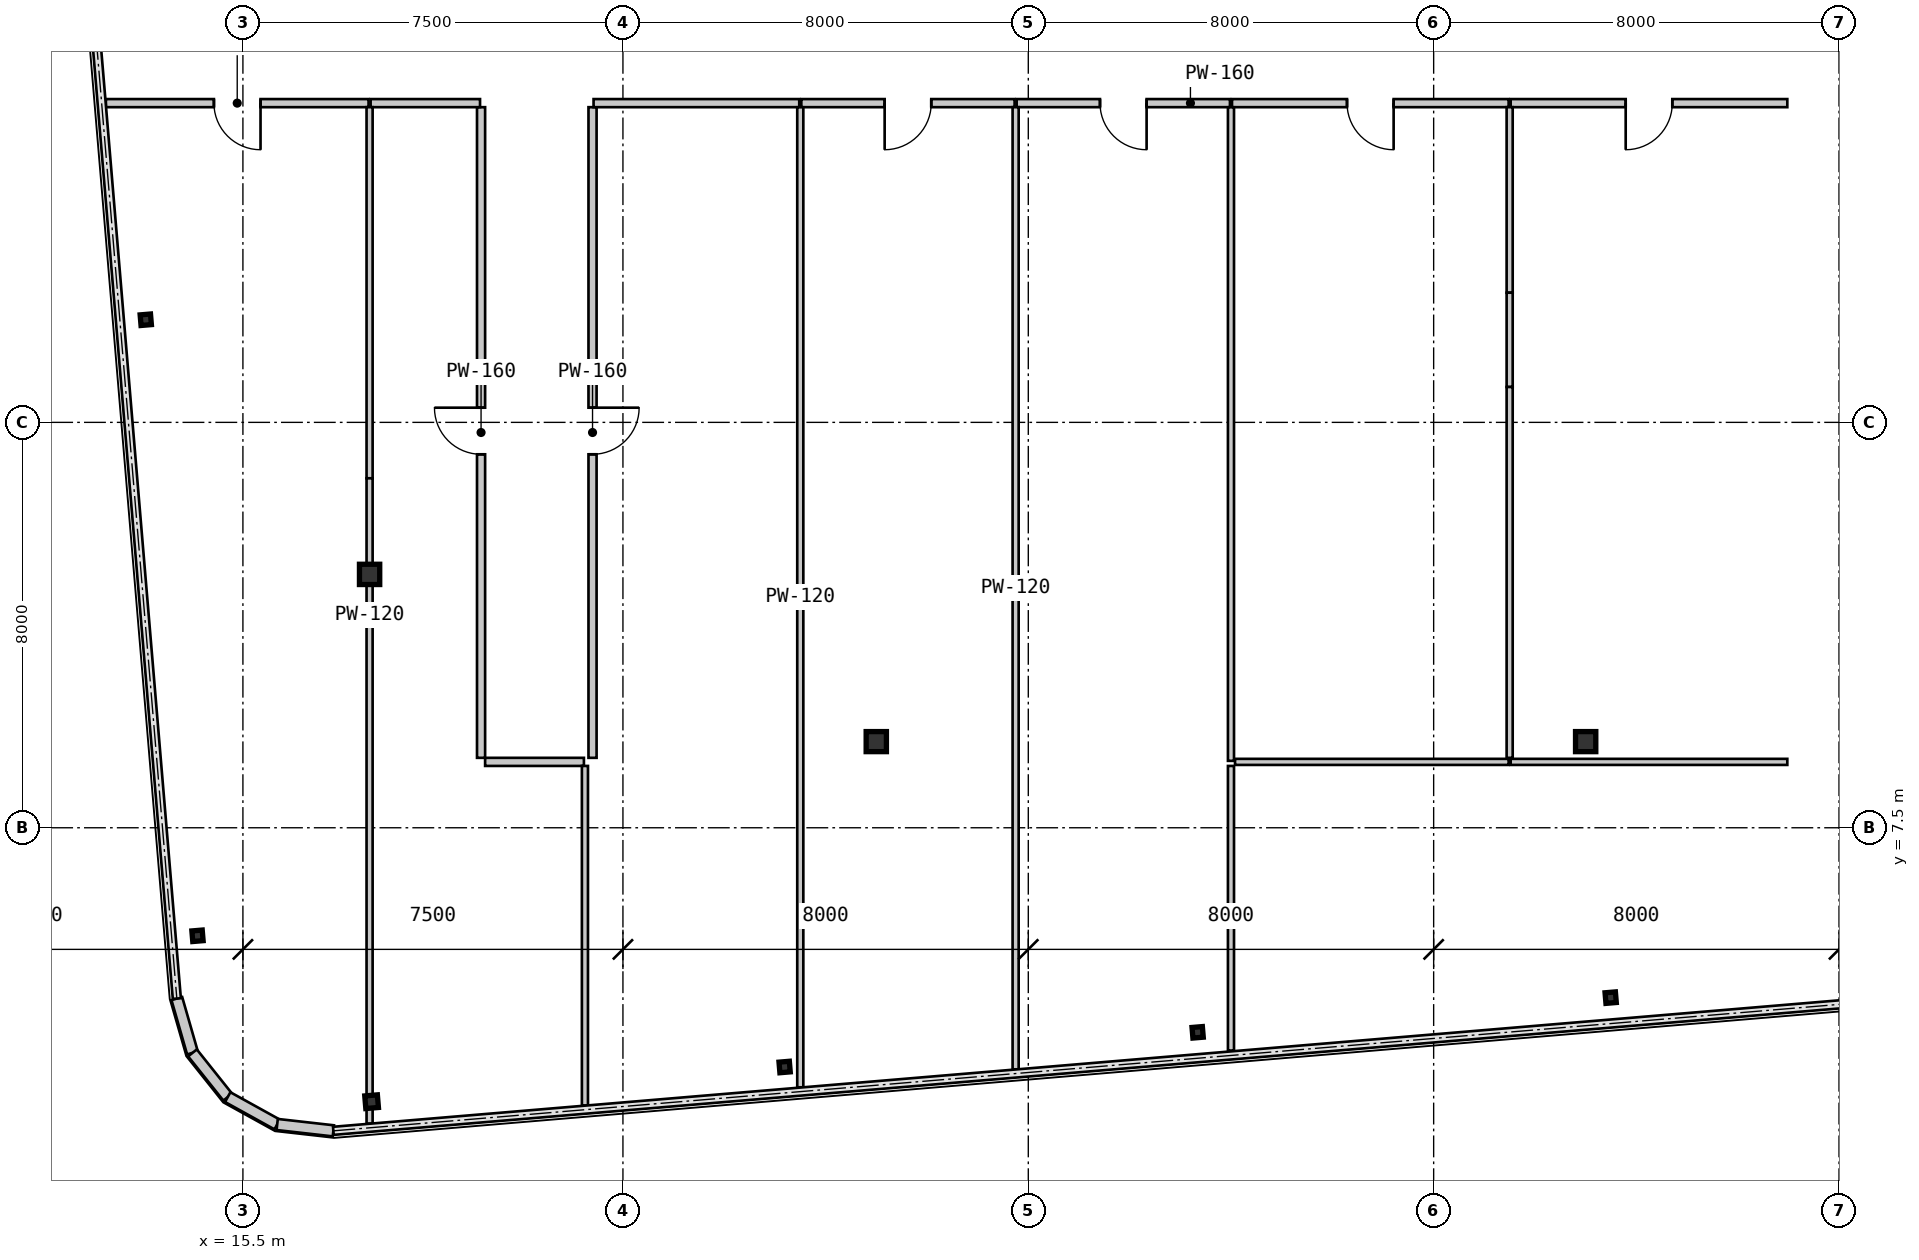
"""IFC4 building model, lengths in metres.
Left out: names, types, materials, properties, quantities, classifications, styles, units other than length and angle.
Written with IfcOpenShell. Run it as: python <this file> out.ifc"""

import sys

from ifc_helpers import new_model, si_unit, direction, frame, frame_2d, origin, origin_2d, place, context, subcontext, project, spatial, rectangle, hollow_rectangle, i_section, extrude, source, transform, mapped, element, fill, save


model = new_model("IFC4")
c1 = context("Model", 3, precision=1e-05, world=origin(), true_north=direction((0.0, 1.0)))
c2 = subcontext(c1, "Body", "Model", "MODEL_VIEW")
j1 = project(units=[si_unit("LENGTHUNIT", "METRE"), si_unit("PLANEANGLEUNIT", "RADIAN")], contexts=[c1])
p1 = place(None, origin())
s1 = spatial("IfcSite", under=j1, at=p1, CompositionType="ELEMENT")
p2 = place(p1, origin())
s2 = spatial("IfcBuilding", under=s1, at=p2, CompositionType="ELEMENT")
p3 = place(p2, frame((0.0, 0.0, 191.45)))
s3 = spatial("IfcBuildingStorey", under=s2, at=p3, CompositionType="ELEMENT", Elevation=191.45)
m1 = source(origin(), c2, "Body", "SweptSolid", [
    extrude(i_section(OverallWidth=0.4, OverallDepth=0.396, WebThickness=0.022, FlangeThickness=0.034, at=origin_2d()), origin(), (0.0, 0.0, 1.0), 3.15),
])
for number, where, z_axis, x_axis in (
    (1, (28.0, 9.2, 0.0), (0.0, 0.0, 1.0), (1.0, 0.0, 0.0)),
    (2, (42.0, 9.2, 0.0), (0.0, 0.0, 1.0), (1.0, 0.0, 0.0)),
):
    element("IfcColumn", number, at=place(p3, frame(where, z_axis=z_axis, x_axis=x_axis)), inside=s3, PredefinedType="COLUMN", context=c2, shape_type="MappedRepresentation", body=[
        mapped(m1, transform((0.0, 0.0, 0.0), scale=1.0)),
    ])
m2 = source(origin(), c2, "Body", "SweptSolid", [
    extrude(hollow_rectangle(XDim=0.4, YDim=0.4, WallThickness=0.016, at=origin_2d()), origin(), (0.0, 0.0, 1.0), 3.15),
])
p4 = place(p3, frame((18.0, 12.5, 0.0), z_axis=(0.0, 0.0, 1.0), x_axis=(1.0, 0.0, 0.0)))
e3 = element("IfcColumn", 3, at=p4, inside=s3, PredefinedType="COLUMN", context=c2, shape_type="MappedRepresentation", body=[
    mapped(m2, transform((0.0, 0.0, 0.0), scale=1.0)),
])
m3 = source(origin(), c2, "Body", "SweptSolid", [
    extrude(hollow_rectangle(XDim=0.25, YDim=0.25, WallThickness=0.01, at=origin_2d()), origin(), (0.0, 0.0, 1.0), 3.15),
])
p5 = place(p3, frame((18.04, 2.094, 0.0), z_axis=(0.0, 0.0, 1.0), x_axis=(0.99649285925, 0.083677843332, 0.0)))
e4 = element("IfcColumn", 4, at=p5, inside=s3, PredefinedType="COLUMN", context=c2, shape_type="MappedRepresentation", body=[
    mapped(m3, transform((0.0, 0.0, 0.0), scale=1.0)),
])
m4 = source(origin(), c2, "Body", "SweptSolid", [
    extrude(i_section(OverallWidth=0.205, OverallDepth=0.21, WebThickness=0.009, FlangeThickness=0.014, at=origin_2d()), origin(), (0.0, 0.0, 1.0), 3.15),
])
for number, where, z_axis, x_axis in (
    (5, (26.191, 2.779, 0.0), (0.0, 0.0, 1.0), (0.996, 0.084, 0.0)),
    (6, (34.342, 3.463, 0.0), (0.0, 0.0, 1.0), (0.996, 0.084, 0.0)),
    (7, (42.494, 4.147, 0.0), (0.0, 0.0, 1.0), (0.996, 0.084, 0.0)),
    (8, (14.604, 5.368, 0.0), (0.0, 0.0, 1.0), (0.996, 0.084, 0.0)),
    (9, (13.583, 17.525, 0.0), (0.0, 0.0, 1.0), (0.996, 0.084, 0.0)),
):
    element("IfcColumn", number, at=place(p3, frame(where, z_axis=z_axis, x_axis=x_axis)), inside=s3, PredefinedType="COLUMN", context=c2, shape_type="MappedRepresentation", body=[
        mapped(m4, transform((0.0, 0.0, 0.0), scale=1.0)),
    ])
m5 = source(origin(), c2, "Body", "SweptSolid", [
    extrude(rectangle(XDim=1.116, YDim=0.22, at=frame_2d((0.558, 0.0))), origin(), (0.0, 0.0, 1.0), 2.93),
])
for number, where, z_axis, x_axis in (
    (10, (14.196, 4.13, 0.0), (0.0, 0.0, 1.0), (0.277, -0.961, 0.0)),
    (11, (14.504, 3.057, 0.0), (0.0, 0.0, 1.0), (0.623, -0.782, 0.0)),
    (12, (15.2, 2.184, 0.0), (0.0, 0.0, 1.0), (0.875, -0.484, 0.0)),
    (13, (16.176, 1.644, 0.0), (0.0, 0.0, 1.0), (0.994, -0.112, 0.0)),
):
    element("IfcWall", number, at=place(p3, frame(where, z_axis=z_axis, x_axis=x_axis)), inside=s3, PredefinedType="SOLIDWALL", context=c2, shape_type="MappedRepresentation", body=[
        mapped(m5, transform((0.0, 0.0, 0.0), scale=1.0)),
    ])
m6 = source(origin(), c2, "Body", "SweptSolid", [
    extrude(rectangle(XDim=5.184, YDim=0.16, at=frame_2d((2.592, 0.0))), origin(), (0.0, 0.0, 1.0), 2.93),
])
p6 = place(p3, frame((17.98, 21.8, 0.0), z_axis=(0.0, 0.0, 1.0), x_axis=(-1.0, 0.0, 0.0)))
e14 = element("IfcWall", 14, at=p6, inside=s3, PredefinedType="PARTITIONING", context=c2, shape_type="MappedRepresentation", body=[
    mapped(m6, transform((0.0, 0.0, 0.0), scale=1.0)),
])
m7 = source(origin(), c2, "Body", "SweptSolid", [
    extrude(rectangle(XDim=0.92, YDim=2.1, at=frame_2d((0.46, 1.05))), frame((0.0, 0.09, 0.0), z_axis=(0.0, -1.0, 0.0), x_axis=(1.0, 0.0, 0.0)), (0.0, 0.0, 1.0), 0.18),
])
p7 = place(p6, frame((2.132, 0.0, 0.0)))
e15 = element("IfcOpeningElement", 15, at=p7, cuts=e14, PredefinedType="OPENING", context=c2, shape_type="MappedRepresentation", body=[
    mapped(m7, transform((0.0, 0.0, 0.0), scale=1.0)),
])
m8 = source(origin(), c2, "Body", "SweptSolid", [
    extrude(rectangle(XDim=12.84, YDim=0.16, at=frame_2d((6.42, 0.0))), origin(), (0.0, 0.0, 1.0), 2.93),
])
p8 = place(p3, frame((20.2, 8.88, 0.0), z_axis=(0.0, 0.0, 1.0), x_axis=(0.0, 1.0, 0.0)))
e16 = element("IfcWall", 16, at=p8, inside=s3, PredefinedType="PARTITIONING", context=c2, shape_type="MappedRepresentation", body=[
    mapped(m8, transform((0.0, 0.0, 0.0), scale=1.0)),
])
p9 = place(p8, frame((5.99, 0.0, 0.0)))
e17 = element("IfcOpeningElement", 17, at=p9, cuts=e16, PredefinedType="OPENING", context=c2, shape_type="MappedRepresentation", body=[
    mapped(m7, transform((0.0, 0.0, 0.0), scale=1.0)),
])
m9 = source(origin(), c2, "Body", "SweptSolid", [
    extrude(rectangle(XDim=2.159, YDim=0.16, at=frame_2d((1.08, 0.0))), origin(), (0.0, 0.0, 1.0), 2.93),
])
p10 = place(p3, frame((20.18, 21.8, 0.0), z_axis=(0.0, 0.0, 1.0), x_axis=(-1.0, 0.0, 0.0)))
e18 = element("IfcWall", 18, at=p10, inside=s3, PredefinedType="PARTITIONING", context=c2, shape_type="MappedRepresentation", body=[
    mapped(m9, transform((0.0, 0.0, 0.0), scale=1.0)),
])
m10 = source(origin(), c2, "Body", "SweptSolid", [
    extrude(rectangle(XDim=1.95, YDim=0.16, at=frame_2d((0.975, 0.0))), origin(), (0.0, 0.0, 1.0), 2.93),
])
p11 = place(p3, frame((22.23, 8.8, 0.0), z_axis=(0.0, 0.0, 1.0), x_axis=(-1.0, 0.0, 0.0)))
e19 = element("IfcWall", 19, at=p11, inside=s3, PredefinedType="PARTITIONING", context=c2, shape_type="MappedRepresentation", body=[
    mapped(m10, transform((0.0, 0.0, 0.0), scale=1.0)),
])
p12 = place(p3, frame((22.4, 21.72, 0.0), z_axis=(0.0, 0.0, 1.0), x_axis=(0.0, -1.0, 0.0)))
e20 = element("IfcWall", 20, at=p12, inside=s3, PredefinedType="PARTITIONING", context=c2, shape_type="MappedRepresentation", body=[
    mapped(m8, transform((0.0, 0.0, 0.0), scale=1.0)),
])
p13 = place(p12, frame((5.93, 0.0, 0.0)))
e21 = element("IfcOpeningElement", 21, at=p13, cuts=e20, PredefinedType="OPENING", context=c2, shape_type="MappedRepresentation", body=[
    mapped(m7, transform((0.0, 0.0, 0.0), scale=1.0)),
])
m11 = source(origin(), c2, "Body", "SweptSolid", [
    extrude(rectangle(XDim=4.059, YDim=0.16, at=frame_2d((2.03, 0.0))), origin(), (0.0, 0.0, 1.0), 2.93),
])
p14 = place(p3, frame((26.48, 21.8, 0.0), z_axis=(0.0, 0.0, 1.0), x_axis=(-1.0, 0.0, 0.0)))
e22 = element("IfcWall", 22, at=p14, inside=s3, PredefinedType="PARTITIONING", context=c2, shape_type="MappedRepresentation", body=[
    mapped(m11, transform((0.0, 0.0, 0.0), scale=1.0)),
])
m12 = source(origin(), c2, "Body", "SweptSolid", [
    extrude(rectangle(XDim=4.209, YDim=0.16, at=frame_2d((2.105, 0.0))), origin(), (0.0, 0.0, 1.0), 2.93),
])
p15 = place(p3, frame((30.73, 21.8, 0.0), z_axis=(0.0, 0.0, 1.0), x_axis=(-1.0, 0.0, 0.0)))
e23 = element("IfcWall", 23, at=p15, inside=s3, PredefinedType="PARTITIONING", context=c2, shape_type="MappedRepresentation", body=[
    mapped(m12, transform((0.0, 0.0, 0.0), scale=1.0)),
])
p16 = place(p15, frame((1.645, 0.0, 0.0)))
e24 = element("IfcOpeningElement", 24, at=p16, cuts=e23, PredefinedType="OPENING", context=c2, shape_type="MappedRepresentation", body=[
    mapped(m7, transform((0.0, 0.0, 0.0), scale=1.0)),
])
p17 = place(p3, frame((34.98, 21.8, 0.0), z_axis=(0.0, 0.0, 1.0), x_axis=(-1.0, 0.0, 0.0)))
e25 = element("IfcWall", 25, at=p17, inside=s3, PredefinedType="PARTITIONING", context=c2, shape_type="MappedRepresentation", body=[
    mapped(m12, transform((0.0, 0.0, 0.0), scale=1.0)),
])
p18 = place(p17, frame((1.645, 0.0, 0.0)))
e26 = element("IfcOpeningElement", 26, at=p18, cuts=e25, PredefinedType="OPENING", context=c2, shape_type="MappedRepresentation", body=[
    mapped(m7, transform((0.0, 0.0, 0.0), scale=1.0)),
])
m13 = source(origin(), c2, "Body", "SweptSolid", [
    extrude(rectangle(XDim=5.459, YDim=0.16, at=frame_2d((2.73, 0.0))), origin(), (0.0, 0.0, 1.0), 2.93),
])
p19 = place(p3, frame((40.48, 21.8, 0.0), z_axis=(0.0, 0.0, 1.0), x_axis=(-1.0, 0.0, 0.0)))
e27 = element("IfcWall", 27, at=p19, inside=s3, PredefinedType="PARTITIONING", context=c2, shape_type="MappedRepresentation", body=[
    mapped(m13, transform((0.0, 0.0, 0.0), scale=1.0)),
])
p20 = place(p19, frame((2.27, 0.0, 0.0)))
e28 = element("IfcOpeningElement", 28, at=p20, cuts=e27, PredefinedType="OPENING", context=c2, shape_type="MappedRepresentation", body=[
    mapped(m7, transform((0.0, 0.0, 0.0), scale=1.0)),
])
p21 = place(p3, frame((45.98, 21.8, 0.0), z_axis=(0.0, 0.0, 1.0), x_axis=(-1.0, 0.0, 0.0)))
e29 = element("IfcWall", 29, at=p21, inside=s3, PredefinedType="PARTITIONING", context=c2, shape_type="MappedRepresentation", body=[
    mapped(m13, transform((0.0, 0.0, 0.0), scale=1.0)),
])
p22 = place(p21, frame((2.27, 0.0, 0.0)))
e30 = element("IfcOpeningElement", 30, at=p22, cuts=e29, PredefinedType="OPENING", context=c2, shape_type="MappedRepresentation", body=[
    mapped(m7, transform((0.0, 0.0, 0.0), scale=1.0)),
])
m14 = source(origin(), c2, "Body", "SweptSolid", [
    extrude(rectangle(XDim=5.616, YDim=0.12, at=frame_2d((2.808, 0.0))), origin(), (0.0, 0.0, 1.0), 2.93),
])
p23 = place(p3, frame((35.0, 3.104, 0.0), z_axis=(0.0, 0.0, 1.0), x_axis=(0.0, 1.0, 0.0)))
e31 = element("IfcWall", 31, at=p23, inside=s3, PredefinedType="PARTITIONING", context=c2, shape_type="MappedRepresentation", body=[
    mapped(m14, transform((0.0, 0.0, 0.0), scale=1.0)),
])
m15 = source(origin(), c2, "Body", "SweptSolid", [
    extrude(rectangle(XDim=5.4, YDim=0.12, at=frame_2d((2.7, 0.0))), origin(), (0.0, 0.0, 1.0), 2.93),
])
p24 = place(p3, frame((35.08, 8.8, 0.0), z_axis=(0.0, 0.0, 1.0), x_axis=(1.0, 0.0, 0.0)))
e32 = element("IfcWall", 32, at=p24, inside=s3, PredefinedType="PARTITIONING", context=c2, shape_type="MappedRepresentation", body=[
    mapped(m15, transform((0.0, 0.0, 0.0), scale=1.0)),
])
m16 = source(origin(), c2, "Body", "SweptSolid", [
    extrude(rectangle(XDim=5.459, YDim=0.12, at=frame_2d((2.73, 0.0))), origin(), (0.0, 0.0, 1.0), 2.93),
])
p25 = place(p3, frame((40.52, 8.8, 0.0), z_axis=(0.0, 0.0, 1.0), x_axis=(1.0, 0.0, 0.0)))
e33 = element("IfcWall", 33, at=p25, inside=s3, PredefinedType="PARTITIONING", context=c2, shape_type="MappedRepresentation", body=[
    mapped(m16, transform((0.0, 0.0, 0.0), scale=1.0)),
])
m17 = source(origin(), c2, "Body", "SweptSolid", [
    extrude(rectangle(XDim=7.324, YDim=0.12, at=frame_2d((3.662, 0.0))), origin(), (0.0, 0.0, 1.0), 2.93),
])
p26 = place(p3, frame((18.0, 21.72, 0.0), z_axis=(0.0, 0.0, 1.0), x_axis=(0.0, -1.0, 0.0)))
e34 = element("IfcWall", 34, at=p26, inside=s3, PredefinedType="PARTITIONING", context=c2, shape_type="MappedRepresentation", body=[
    mapped(m17, transform((0.0, 0.0, 0.0), scale=1.0)),
])
m18 = source(origin(), c2, "Body", "SweptSolid", [
    extrude(rectangle(XDim=1.901, YDim=0.12, at=frame_2d((0.951, 0.0))), origin(), (0.0, 0.0, 1.0), 2.397),
])
p27 = place(p3, frame((18.0, 14.396, 0.0), z_axis=(0.0, 0.0, 1.0), x_axis=(0.0, -1.0, 0.0)))
e35 = element("IfcWall", 35, at=p27, inside=s3, PredefinedType="PARTITIONING", context=c2, shape_type="MappedRepresentation", body=[
    mapped(m18, transform((0.0, 0.0, 0.0), scale=1.0)),
])
m19 = source(origin(), c2, "Body", "SweptSolid", [
    extrude(rectangle(XDim=10.401, YDim=0.12, at=frame_2d((5.201, 0.0))), origin(), (0.0, 0.0, 1.0), 2.47),
])
p28 = place(p3, frame((18.0, 12.495, 0.0), z_axis=(0.0, 0.0, 1.0), x_axis=(0.0, -1.0, 0.0)))
e36 = element("IfcWall", 36, at=p28, inside=s3, PredefinedType="PARTITIONING", context=c2, shape_type="MappedRepresentation", body=[
    mapped(m19, transform((0.0, 0.0, 0.0), scale=1.0)),
])
m20 = source(origin(), c2, "Body", "SweptSolid", [
    extrude(rectangle(XDim=0.431, YDim=0.12, at=frame_2d((0.216, 0.0))), origin(), (0.0, 0.0, 1.0), 2.93),
])
p29 = place(p3, frame((18.0, 2.094, 0.0), z_axis=(0.0, 0.0, 1.0), x_axis=(0.0, -1.0, 0.0)))
e37 = element("IfcWall", 37, at=p29, inside=s3, PredefinedType="PARTITIONING", context=c2, shape_type="MappedRepresentation", body=[
    mapped(m20, transform((0.0, 0.0, 0.0), scale=1.0)),
])
m21 = source(origin(), c2, "Body", "SweptSolid", [
    extrude(rectangle(XDim=6.701, YDim=0.12, at=frame_2d((3.35, 0.0))), origin(), (0.0, 0.0, 1.0), 2.93),
])
p30 = place(p3, frame((22.25, 8.72, 0.0), z_axis=(0.0, 0.0, 1.0), x_axis=(0.0, -1.0, 0.0)))
e38 = element("IfcWall", 38, at=p30, inside=s3, PredefinedType="PARTITIONING", context=c2, shape_type="MappedRepresentation", body=[
    mapped(m21, transform((0.0, 0.0, 0.0), scale=1.0)),
])
m22 = source(origin(), c2, "Body", "SweptSolid", [
    extrude(rectangle(XDim=19.34, YDim=0.12, at=frame_2d((9.67, 0.0))), origin(), (0.0, 0.0, 1.0), 2.93),
])
p31 = place(p3, frame((26.5, 21.718, 0.0), z_axis=(0.0, 0.0, 1.0), x_axis=(0.0, -1.0, 0.0)))
e39 = element("IfcWall", 39, at=p31, inside=s3, PredefinedType="PARTITIONING", context=c2, shape_type="MappedRepresentation", body=[
    mapped(m22, transform((0.0, 0.0, 0.0), scale=1.0)),
])
m23 = source(origin(), c2, "Body", "SweptSolid", [
    extrude(rectangle(XDim=18.987, YDim=0.12, at=frame_2d((9.493, 0.0))), origin(), (0.0, 0.0, 1.0), 2.93),
])
p32 = place(p3, frame((30.75, 21.72, 0.0), z_axis=(0.0, 0.0, 1.0), x_axis=(0.0, -1.0, 0.0)))
e40 = element("IfcWall", 40, at=p32, inside=s3, PredefinedType="PARTITIONING", context=c2, shape_type="MappedRepresentation", body=[
    mapped(m23, transform((0.0, 0.0, 0.0), scale=1.0)),
])
m24 = source(origin(), c2, "Body", "SweptSolid", [
    extrude(rectangle(XDim=12.898, YDim=0.12, at=frame_2d((6.449, 0.0))), origin(), (0.0, 0.0, 1.0), 2.93),
])
p33 = place(p3, frame((35.0, 21.718, 0.0), z_axis=(0.0, 0.0, 1.0), x_axis=(0.0, -1.0, 0.0)))
e41 = element("IfcWall", 41, at=p33, inside=s3, PredefinedType="PARTITIONING", context=c2, shape_type="MappedRepresentation", body=[
    mapped(m24, transform((0.0, 0.0, 0.0), scale=1.0)),
])
m25 = source(origin(), c2, "Body", "SweptSolid", [
    extrude(rectangle(XDim=3.661, YDim=0.12, at=frame_2d((1.831, 0.0))), origin(), (0.0, 0.0, 1.0), 2.93),
])
p34 = place(p3, frame((40.5, 21.72, 0.0), z_axis=(0.0, 0.0, 1.0), x_axis=(0.0, -1.0, 0.0)))
e42 = element("IfcWall", 42, at=p34, inside=s3, PredefinedType="PARTITIONING", context=c2, shape_type="MappedRepresentation", body=[
    mapped(m25, transform((0.0, 0.0, 0.0), scale=1.0)),
])
m26 = source(origin(), c2, "Body", "SweptSolid", [
    extrude(rectangle(XDim=1.861, YDim=0.12, at=frame_2d((0.93, 0.0))), origin(), (0.0, 0.0, 1.0), 2.328),
])
p35 = place(p3, frame((40.5, 18.059, 0.0), z_axis=(0.0, 0.0, 1.0), x_axis=(0.0, -1.0, 0.0)))
e43 = element("IfcWall", 43, at=p35, inside=s3, PredefinedType="PARTITIONING", context=c2, shape_type="MappedRepresentation", body=[
    mapped(m26, transform((0.0, 0.0, 0.0), scale=1.0)),
])
m27 = source(origin(), c2, "Body", "SweptSolid", [
    extrude(rectangle(XDim=7.318, YDim=0.12, at=frame_2d((3.659, 0.0))), origin(), (0.0, 0.0, 1.0), 2.93),
])
p36 = place(p3, frame((40.5, 16.198, 0.0), z_axis=(0.0, 0.0, 1.0), x_axis=(0.0, -1.0, 0.0)))
e44 = element("IfcWall", 44, at=p36, inside=s3, PredefinedType="PARTITIONING", context=c2, shape_type="MappedRepresentation", body=[
    mapped(m27, transform((0.0, 0.0, 0.0), scale=1.0)),
])
m28 = source(origin(), c2, "Body", "SweptSolid", [
    extrude(rectangle(XDim=0.92, YDim=2.1, at=frame_2d((0.46, 1.05))), frame((0.0, 0.025, 0.0), z_axis=(0.0, -1.0, 0.0), x_axis=(1.0, 0.0, 0.0)), (0.0, 0.0, 1.0), 0.05),
])
p37 = place(p7, origin())
e45 = element("IfcDoor", 45, at=p37, inside=s3, OperationType="SINGLE_SWING_LEFT", PredefinedType="DOOR", context=c2, shape_type="MappedRepresentation", body=[
    mapped(m28, transform((0.0, 0.0, 0.0), scale=1.0)),
])
fill(e15, e45)
p38 = place(p9, origin())
e46 = element("IfcDoor", 46, at=p38, inside=s3, OperationType="SINGLE_SWING_RIGHT", PredefinedType="DOOR", context=c2, shape_type="MappedRepresentation", body=[
    mapped(m28, transform((0.0, 0.0, 0.0), scale=1.0)),
])
fill(e17, e46)
p39 = place(p13, origin())
e47 = element("IfcDoor", 47, at=p39, inside=s3, OperationType="SINGLE_SWING_LEFT", PredefinedType="DOOR", context=c2, shape_type="MappedRepresentation", body=[
    mapped(m28, transform((0.0, 0.0, 0.0), scale=1.0)),
])
fill(e21, e47)
p40 = place(p16, origin())
e48 = element("IfcDoor", 48, at=p40, inside=s3, OperationType="SINGLE_SWING_RIGHT", PredefinedType="DOOR", context=c2, shape_type="MappedRepresentation", body=[
    mapped(m28, transform((0.0, 0.0, 0.0), scale=1.0)),
])
fill(e24, e48)
p41 = place(p18, origin())
e49 = element("IfcDoor", 49, at=p41, inside=s3, OperationType="SINGLE_SWING_LEFT", PredefinedType="DOOR", context=c2, shape_type="MappedRepresentation", body=[
    mapped(m28, transform((0.0, 0.0, 0.0), scale=1.0)),
])
fill(e26, e49)
p42 = place(p20, origin())
e50 = element("IfcDoor", 50, at=p42, inside=s3, OperationType="SINGLE_SWING_LEFT", PredefinedType="DOOR", context=c2, shape_type="MappedRepresentation", body=[
    mapped(m28, transform((0.0, 0.0, 0.0), scale=1.0)),
])
fill(e28, e50)
p43 = place(p22, origin())
e51 = element("IfcDoor", 51, at=p43, inside=s3, OperationType="SINGLE_SWING_RIGHT", PredefinedType="DOOR", context=c2, shape_type="MappedRepresentation", body=[
    mapped(m28, transform((0.0, 0.0, 0.0), scale=1.0)),
])
fill(e30, e51)
save(model, sys.argv[1])
